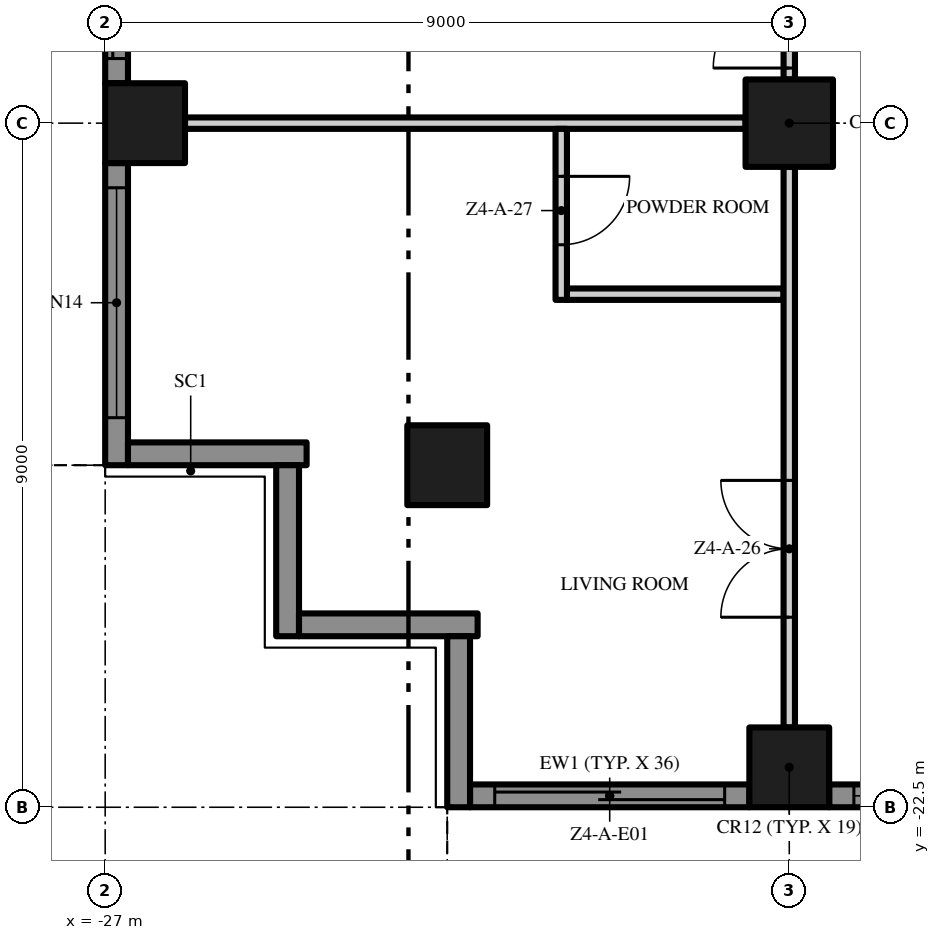
"""IFC4 building model, lengths in metres.
Left out: names, types, materials, properties, quantities, classifications, styles, units other than length and angle.
Written with IfcOpenShell. Run it as: python <this file> out.ifc"""

import sys

from ifc_helpers import new_model, si_unit, direction, frame, frame_2d, origin, origin_2d, place, context, subcontext, project, spatial, polyline, rectangle, outline, extrude, element, fill, save


model = new_model("IFC4")
c1 = context("Model", 3, precision=1e-05, world=origin(), true_north=direction((0.0, 1.0)))
c2 = subcontext(c1, "Body", "Model", "MODEL_VIEW")
j1 = project(units=[si_unit("LENGTHUNIT", "METRE"), si_unit("PLANEANGLEUNIT", "RADIAN")], contexts=[c1])
p1 = place(None, origin())
s1 = spatial("IfcSite", under=j1, at=p1, CompositionType="ELEMENT")
p2 = place(p1, origin())
s2 = spatial("IfcBuilding", under=s1, at=p2, CompositionType="ELEMENT")
p3 = place(p2, frame((0.0, 0.0, 188.2)))
s3 = spatial("IfcBuildingStorey", under=s2, at=p3, CompositionType="ELEMENT", Elevation=188.2)
p4 = place(p3, frame((-18.0, -13.5, 0.0), z_axis=(0.0, 0.0, 1.0), x_axis=(1.0, 0.0, 0.0)))
e1 = element("IfcColumn", 1, at=p4, inside=s3, PredefinedType="COLUMN", context=c2, shape_type="SweptSolid", body=[
    extrude(rectangle(XDim=1.15, YDim=1.15, at=origin_2d()), origin(), (0.0, 0.0, 1.0), 3.5),
])
for number, where, z_axis, x_axis in (
    (2, (-18.0, -21.975, 0.0), (0.0, 0.0, 1.0), (1.0, 0.0, 0.0)),
    (3, (-26.475, -13.5, 0.0), (0.0, 0.0, 1.0), (1.0, 0.0, 0.0)),
    (4, (-22.5, -18.0, 0.0), (0.0, 0.0, 1.0), (1.0, 0.0, 0.0)),
):
    element("IfcColumn", number, at=place(p3, frame(where, z_axis=z_axis, x_axis=x_axis)), inside=s3, PredefinedType="COLUMN", context=c2, shape_type="SweptSolid", body=[
        extrude(rectangle(XDim=1.05, YDim=1.05, at=origin_2d()), origin(), (0.0, 0.0, 1.0), 3.5),
    ])
p5 = place(p3, frame((-18.525, -22.35, 0.0), z_axis=(0.0, 0.0, 1.0), x_axis=(-1.0, 0.0, 0.0)))
e5 = element("IfcWall", 5, at=p5, inside=s3, PredefinedType="SOLIDWALL", context=c2, shape_type="SweptSolid", body=[
    extrude(rectangle(XDim=3.675, YDim=0.3, at=frame_2d((1.837, 0.0))), origin(), (0.0, 0.0, 1.0), 3.5),
])
p6 = place(p5, frame((0.325, 0.0, 0.0)))
e6 = element("IfcOpeningElement", 6, at=p6, cuts=e5, PredefinedType="OPENING", context=c2, shape_type="SweptSolid", body=[
    extrude(rectangle(XDim=3.025, YDim=2.4, at=frame_2d((1.512, 1.2))), frame((0.0, 0.16, 0.0), z_axis=(0.0, -1.0, 0.0), x_axis=(1.0, 0.0, 0.0)), (0.0, 0.0, 1.0), 0.32),
])
p7 = place(p3, frame((-9.525, -22.35, 0.0), z_axis=(0.0, 0.0, 1.0), x_axis=(-1.0, 0.0, 0.0)))
e7 = element("IfcWall", 7, at=p7, inside=s3, PredefinedType="SOLIDWALL", context=c2, shape_type="SweptSolid", body=[
    extrude(rectangle(XDim=7.95, YDim=0.3, at=frame_2d((3.975, 0.0))), origin(), (0.0, 0.0, 1.0), 3.5),
])
p8 = place(p7, frame((4.6, 0.0, 0.45)))
e8 = element("IfcOpeningElement", 8, at=p8, cuts=e7, PredefinedType="OPENING", context=c2, shape_type="SweptSolid", body=[
    extrude(rectangle(XDim=3.025, YDim=2.65, at=frame_2d((1.512, 1.325))), frame((0.0, 0.16, 0.0), z_axis=(0.0, -1.0, 0.0), x_axis=(1.0, 0.0, 0.0)), (0.0, 0.0, 1.0), 0.32),
])
p9 = place(p7, frame((0.325, 0.0, 0.45)))
e9 = element("IfcOpeningElement", 9, at=p9, cuts=e7, PredefinedType="OPENING", context=c2, shape_type="SweptSolid", body=[
    extrude(rectangle(XDim=3.025, YDim=2.65, at=frame_2d((1.512, 1.325))), frame((0.0, 0.16, 0.0), z_axis=(0.0, -1.0, 0.0), x_axis=(1.0, 0.0, 0.0)), (0.0, 0.0, 1.0), 0.32),
])
p10 = place(p3, frame((-26.85, -12.975, 0.0), z_axis=(0.0, 0.0, 1.0), x_axis=(0.0, 1.0, 0.0)))
e10 = element("IfcWall", 10, at=p10, inside=s3, PredefinedType="SOLIDWALL", context=c2, shape_type="SweptSolid", body=[
    extrude(rectangle(XDim=7.95, YDim=0.3, at=frame_2d((3.975, 0.0))), origin(), (0.0, 0.0, 1.0), 3.5),
])
p11 = place(p10, frame((4.6, 0.0, 0.45)))
e11 = element("IfcOpeningElement", 11, at=p11, cuts=e10, PredefinedType="OPENING", context=c2, shape_type="SweptSolid", body=[
    extrude(rectangle(XDim=3.025, YDim=2.65, at=frame_2d((1.512, 1.325))), frame((0.0, 0.16, 0.0), z_axis=(0.0, -1.0, 0.0), x_axis=(1.0, 0.0, 0.0)), (0.0, 0.0, 1.0), 0.32),
])
p12 = place(p10, frame((0.325, 0.0, 0.0)))
e12 = element("IfcOpeningElement", 12, at=p12, cuts=e10, PredefinedType="OPENING", context=c2, shape_type="SweptSolid", body=[
    extrude(rectangle(XDim=3.025, YDim=2.4, at=frame_2d((1.512, 1.2))), frame((0.0, 0.16, 0.0), z_axis=(0.0, -1.0, 0.0), x_axis=(1.0, 0.0, 0.0)), (0.0, 0.0, 1.0), 0.32),
])
p13 = place(p3, frame((-26.85, -18.0, 0.0), z_axis=(0.0, 0.0, 1.0), x_axis=(0.0, 1.0, 0.0)))
e13 = element("IfcWall", 13, at=p13, inside=s3, PredefinedType="SOLIDWALL", context=c2, shape_type="SweptSolid", body=[
    extrude(rectangle(XDim=3.975, YDim=0.3, at=frame_2d((1.988, 0.0))), origin(), (0.0, 0.0, 1.0), 3.5),
])
p14 = place(p13, frame((0.625, 0.0, 0.45)))
e14 = element("IfcOpeningElement", 14, at=p14, cuts=e13, PredefinedType="OPENING", context=c2, shape_type="SweptSolid", body=[
    extrude(rectangle(XDim=3.025, YDim=2.65, at=frame_2d((1.512, 1.325))), frame((0.0, 0.16, 0.0), z_axis=(0.0, -1.0, 0.0), x_axis=(1.0, 0.0, 0.0)), (0.0, 0.0, 1.0), 0.32),
])
p15 = place(p3, frame((-24.35, -17.85, 0.0), z_axis=(0.0, 0.0, 1.0), x_axis=(-1.0, 0.0, 0.0)))
e15 = element("IfcWall", 15, at=p15, inside=s3, PredefinedType="SOLIDWALL", context=c2, shape_type="SweptSolid", body=[
    extrude(rectangle(XDim=2.35, YDim=0.3, at=frame_2d((1.175, 0.0))), origin(), (0.0, 0.0, 1.0), 3.5),
])
p16 = place(p3, frame((-24.6, -20.25, 0.0), z_axis=(0.0, 0.0, 1.0), x_axis=(0.0, 1.0, 0.0)))
e16 = element("IfcWall", 16, at=p16, inside=s3, PredefinedType="SOLIDWALL", context=c2, shape_type="SweptSolid", body=[
    extrude(rectangle(XDim=2.25, YDim=0.3, at=frame_2d((1.125, 0.0))), origin(), (0.0, 0.0, 1.0), 3.5),
])
p17 = place(p3, frame((-22.1, -20.1, 0.0), z_axis=(0.0, 0.0, 1.0), x_axis=(-1.0, 0.0, 0.0)))
e17 = element("IfcWall", 17, at=p17, inside=s3, PredefinedType="SOLIDWALL", context=c2, shape_type="SweptSolid", body=[
    extrude(rectangle(XDim=2.35, YDim=0.3, at=frame_2d((1.175, 0.0))), origin(), (0.0, 0.0, 1.0), 3.5),
])
p18 = place(p3, frame((-22.35, -22.5, 0.0), z_axis=(0.0, 0.0, 1.0), x_axis=(0.0, 1.0, 0.0)))
e18 = element("IfcWall", 18, at=p18, inside=s3, PredefinedType="SOLIDWALL", context=c2, shape_type="SweptSolid", body=[
    extrude(rectangle(XDim=2.25, YDim=0.3, at=frame_2d((1.125, 0.0))), origin(), (0.0, 0.0, 1.0), 3.5),
])
p19 = place(p3, origin())
e19 = element("IfcWall", 19, at=p19, inside=s3, PredefinedType="USERDEFINED", context=c2, shape_type="SweptSolid", body=[
    extrude(outline(polyline([(-22.5, -25.5), (-21.0, -25.271), (-19.5, -24.671), (-18.0, -23.929), (-16.5, -23.329), (-15.0, -23.1), (-13.5, -23.329), (-12.0, -23.929), (-10.5, -24.671), (-9.0, -25.271), (-7.5, -25.5), (-6.0, -25.271), (-4.5, -24.671), (-3.0, -23.929), (-1.5, -23.329), (0.0, -23.1), (1.5, -23.329), (3.0, -23.929), (4.5, -24.671), (6.0, -25.271), (7.5, -25.5), (9.0, -25.271), (10.5, -24.671), (12.0, -23.929), (13.5, -23.329), (15.0, -23.1), (16.5, -23.329), (18.0, -23.929), (19.5, -24.671), (21.0, -25.271), (22.5, -25.5), (22.538, -25.253), (21.066, -25.028), (19.602, -24.442), (18.102, -23.701), (16.566, -23.086), (15.0, -22.847), (13.434, -23.086), (11.898, -23.701), (10.398, -24.442), (8.934, -25.028), (7.5, -25.247), (6.066, -25.028), (4.602, -24.442), (3.102, -23.701), (1.566, -23.086), (0.0, -22.847), (-1.566, -23.086), (-3.102, -23.701), (-4.602, -24.442), (-6.066, -25.028), (-7.5, -25.247), (-8.934, -25.028), (-10.398, -24.442), (-11.898, -23.701), (-13.434, -23.086), (-15.0, -22.847), (-16.566, -23.086), (-18.102, -23.701), (-19.602, -24.442), (-21.066, -25.028), (-22.538, -25.253), (-22.5, -25.5)])), origin(), (0.0, 0.0, 1.0), 0.9),
])
p20 = place(p3, origin())
e20 = element("IfcWall", 20, at=p20, inside=s3, PredefinedType="USERDEFINED", context=c2, shape_type="SweptSolid", body=[
    extrude(outline(polyline([(-30.0, 18.0), (-29.771, 16.5), (-29.171, 15.0), (-28.429, 13.5), (-27.829, 12.0), (-27.6, 10.5), (-27.829, 9.0), (-28.429, 7.5), (-29.171, 6.0), (-29.771, 4.5), (-30.0, 3.0), (-29.771, 1.5), (-29.171, 0.0), (-28.429, -1.5), (-27.829, -3.0), (-27.6, -4.5), (-27.829, -6.0), (-28.429, -7.5), (-29.171, -9.0), (-29.771, -10.5), (-30.0, -12.0), (-29.771, -13.5), (-29.171, -15.0), (-28.429, -16.5), (-27.829, -18.0), (-27.597, -17.907), (-28.201, -16.398), (-28.942, -14.898), (-29.528, -13.434), (-29.747, -12.0), (-29.528, -10.566), (-28.942, -9.102), (-28.201, -7.602), (-27.586, -6.066), (-27.347, -4.5), (-27.586, -2.934), (-28.201, -1.398), (-28.942, 0.102), (-29.528, 1.566), (-29.747, 3.0), (-29.528, 4.434), (-28.942, 5.898), (-28.201, 7.398), (-27.586, 8.934), (-27.347, 10.5), (-27.586, 12.066), (-28.201, 13.602), (-28.942, 15.102), (-29.528, 16.566), (-29.753, 18.038), (-30.0, 18.0)])), origin(), (0.0, 0.0, 1.0), 0.9),
])
p21 = place(p3, frame((-20.925, -15.75, 0.0), z_axis=(0.0, 0.0, 1.0), x_axis=(1.0, 0.0, 0.0)))
e21 = element("IfcWall", 21, at=p21, inside=s3, PredefinedType="PARTITIONING", context=c2, shape_type="SweptSolid", body=[
    extrude(rectangle(XDim=2.85, YDim=0.15, at=frame_2d((1.425, 0.0))), origin(), (0.0, 0.0, 1.0), 3.5),
])
p22 = place(p3, frame((-25.95, -13.5, 0.0), z_axis=(0.0, 0.0, 1.0), x_axis=(1.0, 0.0, 0.0)))
e22 = element("IfcWall", 22, at=p22, inside=s3, PredefinedType="PARTITIONING", context=c2, shape_type="SweptSolid", body=[
    extrude(rectangle(XDim=7.375, YDim=0.15, at=frame_2d((3.688, 0.0))), origin(), (0.0, 0.0, 1.0), 3.5),
])
p23 = place(p3, frame((-21.0, -13.575, 0.0), z_axis=(0.0, 0.0, 1.0), x_axis=(0.0, -1.0, 0.0)))
e23 = element("IfcWall", 23, at=p23, inside=s3, PredefinedType="PARTITIONING", context=c2, shape_type="SweptSolid", body=[
    extrude(rectangle(XDim=2.25, YDim=0.15, at=frame_2d((1.125, 0.0))), origin(), (0.0, 0.0, 1.0), 3.5),
])
p24 = place(p23, frame((0.625, 0.0, 0.0)))
e24 = element("IfcOpeningElement", 24, at=p24, cuts=e23, PredefinedType="OPENING", context=c2, shape_type="SweptSolid", body=[
    extrude(rectangle(XDim=0.9, YDim=2.1, at=frame_2d((0.45, 1.05))), frame((0.0, 0.085, 0.0), z_axis=(0.0, -1.0, 0.0), x_axis=(1.0, 0.0, 0.0)), (0.0, 0.0, 1.0), 0.17),
])
p25 = place(p3, frame((-18.0, -21.45, 0.0), z_axis=(0.0, 0.0, 1.0), x_axis=(0.0, 1.0, 0.0)))
e25 = element("IfcWall", 25, at=p25, inside=s3, PredefinedType="PARTITIONING", context=c2, shape_type="SweptSolid", body=[
    extrude(rectangle(XDim=7.375, YDim=0.15, at=frame_2d((3.688, 0.0))), origin(), (0.0, 0.0, 1.0), 3.5),
])
p26 = place(p25, frame((1.45, 0.0, 0.0)))
e26 = element("IfcOpeningElement", 26, at=p26, cuts=e25, PredefinedType="OPENING", context=c2, shape_type="SweptSolid", body=[
    extrude(rectangle(XDim=1.8, YDim=2.4, at=frame_2d((0.9, 1.2))), frame((0.0, 0.085, 0.0), z_axis=(0.0, -1.0, 0.0), x_axis=(1.0, 0.0, 0.0)), (0.0, 0.0, 1.0), 0.17),
])
p27 = place(p3, frame((-18.0, -12.925, 0.0), z_axis=(0.0, 0.0, 1.0), x_axis=(0.0, 1.0, 0.0)))
e27 = element("IfcWall", 27, at=p27, inside=s3, PredefinedType="PARTITIONING", context=c2, shape_type="SweptSolid", body=[
    extrude(rectangle(XDim=7.85, YDim=0.15, at=frame_2d((3.925, 0.0))), origin(), (0.0, 0.0, 1.0), 3.5),
])
p28 = place(p27, frame((6.7, 0.0, 0.0)))
e28 = element("IfcOpeningElement", 28, at=p28, cuts=e27, PredefinedType="OPENING", context=c2, shape_type="SweptSolid", body=[
    extrude(rectangle(XDim=1.0, YDim=2.4, at=frame_2d((0.5, 1.2))), frame((0.0, 0.085, 0.0), z_axis=(0.0, -1.0, 0.0), x_axis=(1.0, 0.0, 0.0)), (0.0, 0.0, 1.0), 0.17),
])
p29 = place(p27, frame((0.15, 0.0, 0.0)))
e29 = element("IfcOpeningElement", 29, at=p29, cuts=e27, PredefinedType="OPENING", context=c2, shape_type="SweptSolid", body=[
    extrude(rectangle(XDim=1.0, YDim=2.4, at=frame_2d((0.5, 1.2))), frame((0.0, 0.085, 0.0), z_axis=(0.0, -1.0, 0.0), x_axis=(1.0, 0.0, 0.0)), (0.0, 0.0, 1.0), 0.17),
])
p30 = place(p6, origin())
e30 = element("IfcDoor", 30, at=p30, inside=s3, OperationType="SINGLE_SWING_LEFT", PredefinedType="DOOR", context=c2, shape_type="SweptSolid", body=[
    extrude(rectangle(XDim=3.025, YDim=2.4, at=frame_2d((1.512, 1.2))), frame((0.0, 0.025, 0.0), z_axis=(0.0, -1.0, 0.0), x_axis=(1.0, 0.0, 0.0)), (0.0, 0.0, 1.0), 0.05),
])
fill(e6, e30)
p31 = place(p8, origin())
e31 = element("IfcWindow", 31, at=p31, inside=s3, PartitioningType="SINGLE_PANEL", PredefinedType="WINDOW", context=c2, shape_type="SweptSolid", body=[
    extrude(rectangle(XDim=3.025, YDim=2.65, at=frame_2d((1.512, 1.325))), frame((0.0, 0.03, 0.0), z_axis=(0.0, -1.0, 0.0), x_axis=(1.0, 0.0, 0.0)), (0.0, 0.0, 1.0), 0.06),
])
fill(e8, e31)
p32 = place(p12, origin())
e32 = element("IfcDoor", 32, at=p32, inside=s3, OperationType="SINGLE_SWING_LEFT", PredefinedType="DOOR", context=c2, shape_type="SweptSolid", body=[
    extrude(rectangle(XDim=3.025, YDim=2.4, at=frame_2d((1.512, 1.2))), frame((0.0, 0.025, 0.0), z_axis=(0.0, -1.0, 0.0), x_axis=(1.0, 0.0, 0.0)), (0.0, 0.0, 1.0), 0.05),
])
fill(e12, e32)
p33 = place(p14, origin())
e33 = element("IfcWindow", 33, at=p33, inside=s3, PartitioningType="SINGLE_PANEL", PredefinedType="WINDOW", context=c2, shape_type="SweptSolid", body=[
    extrude(rectangle(XDim=3.025, YDim=2.65, at=frame_2d((1.512, 1.325))), frame((0.0, 0.03, 0.0), z_axis=(0.0, -1.0, 0.0), x_axis=(1.0, 0.0, 0.0)), (0.0, 0.0, 1.0), 0.06),
])
fill(e14, e33)
p34 = place(p29, origin())
e34 = element("IfcDoor", 34, at=p34, inside=s3, OperationType="SINGLE_SWING_LEFT", PredefinedType="DOOR", context=c2, shape_type="SweptSolid", body=[
    extrude(rectangle(XDim=1.0, YDim=2.4, at=frame_2d((0.5, 1.2))), frame((0.0, 0.025, 0.0), z_axis=(0.0, -1.0, 0.0), x_axis=(1.0, 0.0, 0.0)), (0.0, 0.0, 1.0), 0.05),
])
fill(e29, e34)
p35 = place(p26, origin())
e35 = element("IfcDoor", 35, at=p35, inside=s3, OperationType="DOUBLE_DOOR_SINGLE_SWING", PredefinedType="DOOR", context=c2, shape_type="SweptSolid", body=[
    extrude(rectangle(XDim=1.8, YDim=2.4, at=frame_2d((0.9, 1.2))), frame((0.0, 0.025, 0.0), z_axis=(0.0, -1.0, 0.0), x_axis=(1.0, 0.0, 0.0)), (0.0, 0.0, 1.0), 0.05),
])
fill(e26, e35)
p36 = place(p24, origin())
e36 = element("IfcDoor", 36, at=p36, inside=s3, OperationType="SINGLE_SWING_LEFT", PredefinedType="DOOR", context=c2, shape_type="SweptSolid", body=[
    extrude(rectangle(XDim=0.9, YDim=2.1, at=frame_2d((0.45, 1.05))), frame((0.0, 0.025, 0.0), z_axis=(0.0, -1.0, 0.0), x_axis=(1.0, 0.0, 0.0)), (0.0, 0.0, 1.0), 0.05),
])
fill(e24, e36)
save(model, sys.argv[1])
